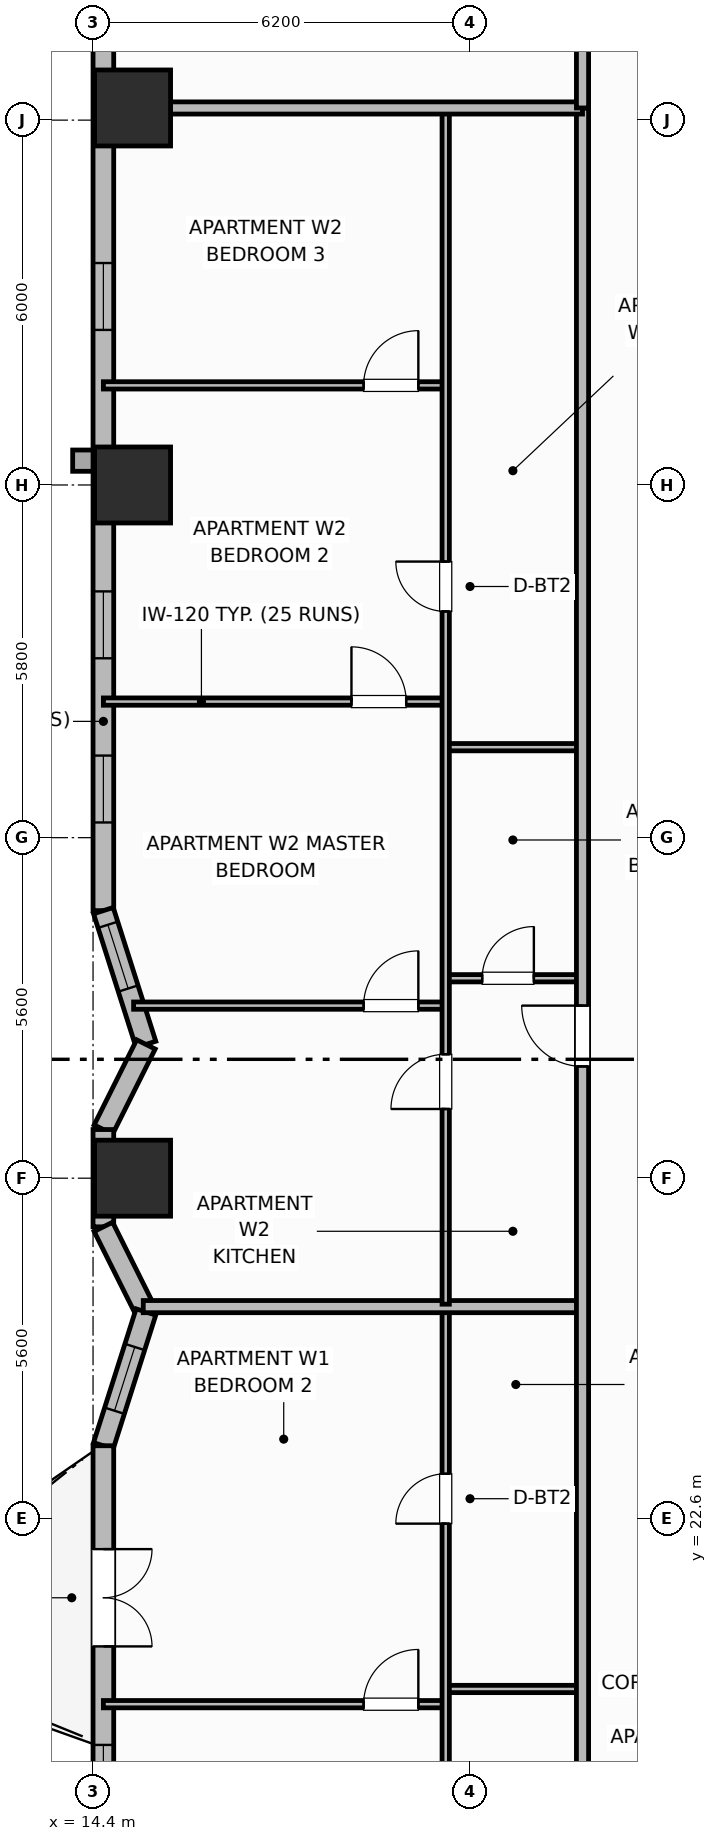
"""IFC4 building model, lengths in metres.
Left out: names, types, materials, properties, quantities, classifications, styles, units other than length and angle.
Written with IfcOpenShell. Run it as: python <this file> out.ifc"""

import sys

from ifc_helpers import new_model, si_unit, direction, frame, frame_2d, origin, origin_2d, place, context, subcontext, project, spatial, rectangle, extrude, element, fill, save


model = new_model("IFC4")
c1 = context("Model", 3, precision=1e-05, world=origin(), true_north=direction((0.0, 1.0)))
c2 = subcontext(c1, "Body", "Model", "MODEL_VIEW")
j1 = project(units=[si_unit("LENGTHUNIT", "METRE"), si_unit("PLANEANGLEUNIT", "RADIAN")], contexts=[c1])
p1 = place(None, origin())
s1 = spatial("IfcSite", under=j1, at=p1, CompositionType="ELEMENT")
p2 = place(p1, origin())
s2 = spatial("IfcBuilding", under=s1, at=p2, CompositionType="ELEMENT")
p3 = place(p2, frame((0.0, 0.0, 58.4)))
s3 = spatial("IfcBuildingStorey", under=s2, at=p3, CompositionType="ELEMENT", Elevation=58.4)
for number, where, z_axis, x_axis in (
    (1, (15.05, 28.2, 0.0), (0.0, 0.0, 1.0), (1.0, 0.0, 0.0)),
    (2, (15.05, 39.6, 0.0), (0.0, 0.0, 1.0), (1.0, 0.0, 0.0)),
    (3, (15.05, 45.8, 0.0), (0.0, 0.0, 1.0), (1.0, 0.0, 0.0)),
):
    element("IfcColumn", number, at=place(p3, frame(where, z_axis=z_axis, x_axis=x_axis)), inside=s3, PredefinedType="COLUMN", context=c2, shape_type="SweptSolid", body=[
        extrude(rectangle(XDim=1.25, YDim=1.25, at=origin_2d()), origin(), (0.0, 0.0, 1.0), 3.7),
    ])
p4 = place(p3, frame((14.57, 47.4, 0.0), z_axis=(0.0, 0.0, 1.0), x_axis=(0.0, -1.0, 0.0)))
e4 = element("IfcWall", 4, at=p4, inside=s3, PredefinedType="SOLIDWALL", context=c2, shape_type="SweptSolid", body=[
    extrude(rectangle(XDim=14.8, YDim=0.34, at=frame_2d((7.4, 0.0))), origin(), (0.0, 0.0, 1.0), 2.7),
])
p5 = place(p4, frame((4.15, 0.0, 0.93)))
e5 = element("IfcOpeningElement", 5, at=p5, cuts=e4, PredefinedType="OPENING", context=c2, shape_type="SweptSolid", body=[
    extrude(rectangle(XDim=1.1, YDim=1.65, at=frame_2d((0.55, 0.825))), frame((0.0, 0.18, 0.0), z_axis=(0.0, -1.0, 0.0), x_axis=(1.0, 0.0, 0.0)), (0.0, 0.0, 1.0), 0.36),
])
p6 = place(p4, frame((9.55, 0.0, 0.93)))
e6 = element("IfcOpeningElement", 6, at=p6, cuts=e4, PredefinedType="OPENING", context=c2, shape_type="SweptSolid", body=[
    extrude(rectangle(XDim=1.1, YDim=1.65, at=frame_2d((0.55, 0.825))), frame((0.0, 0.18, 0.0), z_axis=(0.0, -1.0, 0.0), x_axis=(1.0, 0.0, 0.0)), (0.0, 0.0, 1.0), 0.36),
])
p7 = place(p4, frame((12.25, 0.0, 0.93)))
e7 = element("IfcOpeningElement", 7, at=p7, cuts=e4, PredefinedType="OPENING", context=c2, shape_type="SweptSolid", body=[
    extrude(rectangle(XDim=1.1, YDim=1.65, at=frame_2d((0.55, 0.825))), frame((0.0, 0.18, 0.0), z_axis=(0.0, -1.0, 0.0), x_axis=(1.0, 0.0, 0.0)), (0.0, 0.0, 1.0), 0.36),
])
p8 = place(p3, frame((14.57, 32.6, 0.0), z_axis=(0.0, 0.0, 1.0), x_axis=(0.303160011437, -0.952939666225, 0.0)))
e8 = element("IfcWall", 8, at=p8, inside=s3, PredefinedType="SOLIDWALL", context=c2, shape_type="SweptSolid", body=[
    extrude(rectangle(XDim=2.309, YDim=0.34, at=frame_2d((1.154, 0.0))), origin(), (0.0, 0.0, 1.0), 2.7),
])
p9 = place(p8, frame((0.244, 0.0, 0.89)))
e9 = element("IfcOpeningElement", 9, at=p9, cuts=e8, PredefinedType="OPENING", context=c2, shape_type="SweptSolid", body=[
    extrude(rectangle(XDim=1.1, YDim=1.65, at=frame_2d((0.55, 0.825))), frame((0.0, 0.18, 0.0), z_axis=(0.0, -1.0, 0.0), x_axis=(1.0, 0.0, 0.0)), (0.0, 0.0, 1.0), 0.36),
])
p10 = place(p3, frame((15.27, 30.4, 0.0), z_axis=(0.0, 0.0, 1.0), x_axis=(-0.4472135955, -0.894427191, 0.0)))
e10 = element("IfcWall", 10, at=p10, inside=s3, PredefinedType="SOLIDWALL", context=c2, shape_type="SweptSolid", body=[
    extrude(rectangle(XDim=1.565, YDim=0.34, at=frame_2d((0.783, 0.0))), origin(), (0.0, 0.0, 1.0), 2.7),
])
p11 = place(p3, frame((14.57, 29.0, 0.0), z_axis=(0.0, 0.0, 1.0), x_axis=(0.0, -1.0, 0.0)))
e11 = element("IfcWall", 11, at=p11, inside=s3, PredefinedType="SOLIDWALL", context=c2, shape_type="SweptSolid", body=[
    extrude(rectangle(XDim=1.6, YDim=0.34, at=frame_2d((0.8, 0.0))), origin(), (0.0, 0.0, 1.0), 2.7),
])
p12 = place(p3, frame((14.57, 27.4, 0.0), z_axis=(0.0, 0.0, 1.0), x_axis=(0.4472135955, -0.894427191, 0.0)))
e12 = element("IfcWall", 12, at=p12, inside=s3, PredefinedType="SOLIDWALL", context=c2, shape_type="SweptSolid", body=[
    extrude(rectangle(XDim=1.565, YDim=0.34, at=frame_2d((0.783, 0.0))), origin(), (0.0, 0.0, 1.0), 2.7),
])
p13 = place(p3, frame((15.27, 26.0, 0.0), z_axis=(0.0, 0.0, 1.0), x_axis=(-0.303190562272, -0.952929946507, 0.0)))
e13 = element("IfcWall", 13, at=p13, inside=s3, PredefinedType="SOLIDWALL", context=c2, shape_type="SweptSolid", body=[
    extrude(rectangle(XDim=2.309, YDim=0.34, at=frame_2d((1.154, 0.0))), origin(), (0.0, 0.0, 1.0), 2.7),
])
p14 = place(p13, frame((0.604, 0.0, 0.89)))
e14 = element("IfcOpeningElement", 14, at=p14, cuts=e13, PredefinedType="OPENING", context=c2, shape_type="SweptSolid", body=[
    extrude(rectangle(XDim=1.1, YDim=1.65, at=frame_2d((0.55, 0.825))), frame((0.0, 0.18, 0.0), z_axis=(0.0, -1.0, 0.0), x_axis=(1.0, 0.0, 0.0)), (0.0, 0.0, 1.0), 0.36),
])
p15 = place(p3, frame((14.57, 23.8, 0.0), z_axis=(0.0, 0.0, 1.0), x_axis=(0.0, -1.0, 0.0)))
e15 = element("IfcWall", 15, at=p15, inside=s3, PredefinedType="SOLIDWALL", context=c2, shape_type="SweptSolid", body=[
    extrude(rectangle(XDim=14.8, YDim=0.34, at=frame_2d((7.4, 0.0))), origin(), (0.0, 0.0, 1.0), 2.7),
])
p16 = place(p15, frame((1.7, 0.0, 0.0)))
e16 = element("IfcOpeningElement", 16, at=p16, cuts=e15, PredefinedType="OPENING", context=c2, shape_type="SweptSolid", body=[
    extrude(rectangle(XDim=1.6, YDim=2.1, at=frame_2d((0.8, 1.05))), frame((0.0, 0.18, 0.0), z_axis=(0.0, -1.0, 0.0), x_axis=(1.0, 0.0, 0.0)), (0.0, 0.0, 1.0), 0.36),
])
p17 = place(p15, frame((4.92, 0.0, 0.69)))
e17 = element("IfcOpeningElement", 17, at=p17, cuts=e15, PredefinedType="OPENING", context=c2, shape_type="SweptSolid", body=[
    extrude(rectangle(XDim=1.4, YDim=1.85, at=frame_2d((0.7, 0.925))), frame((0.0, 0.18, 0.0), z_axis=(0.0, -1.0, 0.0), x_axis=(1.0, 0.0, 0.0)), (0.0, 0.0, 1.0), 0.36),
])
p18 = place(p15, frame((9.8, 0.0, 0.68)))
e18 = element("IfcOpeningElement", 18, at=p18, cuts=e15, PredefinedType="OPENING", context=c2, shape_type="SweptSolid", body=[
    extrude(rectangle(XDim=2.1, YDim=1.9, at=frame_2d((1.05, 0.95))), frame((0.0, 0.18, 0.0), z_axis=(0.0, -1.0, 0.0), x_axis=(1.0, 0.0, 0.0)), (0.0, 0.0, 1.0), 0.36),
])
p19 = place(p3, frame((20.2, 19.8, 0.0), z_axis=(0.0, 0.0, 1.0), x_axis=(1.0, 0.0, 0.0)))
e19 = element("IfcWall", 19, at=p19, inside=s3, PredefinedType="PARTITIONING", context=c2, shape_type="SweptSolid", body=[
    extrude(rectangle(XDim=2.25, YDim=0.12, at=frame_2d((1.125, 0.0))), origin(), (0.0, 0.0, 1.0), 2.53),
])
p20 = place(p3, frame((14.57, 19.55, 0.0), z_axis=(0.0, 0.0, 1.0), x_axis=(1.0, 0.0, 0.0)))
e20 = element("IfcWall", 20, at=p20, inside=s3, PredefinedType="PARTITIONING", context=c2, shape_type="SweptSolid", body=[
    extrude(rectangle(XDim=5.63, YDim=0.12, at=frame_2d((2.815, 0.0))), origin(), (0.0, 0.0, 1.0), 2.53),
])
p21 = place(p20, frame((4.28, 0.0, 0.0)))
e21 = element("IfcOpeningElement", 21, at=p21, cuts=e20, PredefinedType="OPENING", context=c2, shape_type="SweptSolid", body=[
    extrude(rectangle(XDim=0.9, YDim=2.1, at=frame_2d((0.45, 1.05))), frame((0.0, 0.07, 0.0), z_axis=(0.0, -1.0, 0.0), x_axis=(1.0, 0.0, 0.0)), (0.0, 0.0, 1.0), 0.14),
])
p22 = place(p3, frame((20.2, 10.64, 0.0), z_axis=(0.0, 0.0, 1.0), x_axis=(0.0, 1.0, 0.0)))
e22 = element("IfcWall", 22, at=p22, inside=s3, PredefinedType="PARTITIONING", context=c2, shape_type="SweptSolid", body=[
    extrude(rectangle(XDim=15.408, YDim=0.12, at=frame_2d((7.704, 0.0))), origin(), (0.0, 0.0, 1.0), 2.53),
])
p23 = place(p22, frame((0.41, 0.0, 0.0)))
e23 = element("IfcOpeningElement", 23, at=p23, cuts=e22, PredefinedType="OPENING", context=c2, shape_type="SweptSolid", body=[
    extrude(rectangle(XDim=0.9, YDim=2.1, at=frame_2d((0.45, 1.05))), frame((0.0, 0.07, 0.0), z_axis=(0.0, -1.0, 0.0), x_axis=(1.0, 0.0, 0.0)), (0.0, 0.0, 1.0), 0.14),
])
p24 = place(p22, frame((11.879, 0.0, 0.0)))
e24 = element("IfcOpeningElement", 24, at=p24, cuts=e22, PredefinedType="OPENING", context=c2, shape_type="SweptSolid", body=[
    extrude(rectangle(XDim=0.82, YDim=2.08, at=frame_2d((0.41, 1.04))), frame((0.0, 0.07, 0.0), z_axis=(0.0, -1.0, 0.0), x_axis=(1.0, 0.0, 0.0)), (0.0, 0.0, 1.0), 0.14),
])
p25 = place(p3, frame((15.226, 26.088, 0.0), z_axis=(0.0, 0.0, 1.0), x_axis=(1.0, 0.0, 0.0)))
e25 = element("IfcWall", 25, at=p25, inside=s3, PredefinedType="PARTITIONING", context=c2, shape_type="SweptSolid", body=[
    extrude(rectangle(XDim=7.224, YDim=0.2, at=frame_2d((3.612, 0.0))), origin(), (0.0, 0.0, 1.0), 2.53),
])
p26 = place(p3, frame((20.2, 31.488, 0.0), z_axis=(0.0, 0.0, 1.0), x_axis=(1.0, 0.0, 0.0)))
e26 = element("IfcWall", 26, at=p26, inside=s3, PredefinedType="PARTITIONING", context=c2, shape_type="SweptSolid", body=[
    extrude(rectangle(XDim=2.25, YDim=0.12, at=frame_2d((1.125, 0.0))), origin(), (0.0, 0.0, 1.0), 2.53),
])
p27 = place(p26, frame((0.6, 0.0, 0.0)))
e27 = element("IfcOpeningElement", 27, at=p27, cuts=e26, PredefinedType="OPENING", context=c2, shape_type="SweptSolid", body=[
    extrude(rectangle(XDim=0.85, YDim=2.1, at=frame_2d((0.425, 1.05))), frame((0.0, 0.07, 0.0), z_axis=(0.0, -1.0, 0.0), x_axis=(1.0, 0.0, 0.0)), (0.0, 0.0, 1.0), 0.14),
])
p28 = place(p3, frame((20.2, 35.288, 0.0), z_axis=(0.0, 0.0, 1.0), x_axis=(1.0, 0.0, 0.0)))
e28 = element("IfcWall", 28, at=p28, inside=s3, PredefinedType="PARTITIONING", context=c2, shape_type="SweptSolid", body=[
    extrude(rectangle(XDim=2.25, YDim=0.12, at=frame_2d((1.125, 0.0))), origin(), (0.0, 0.0, 1.0), 2.53),
])
p29 = place(p3, frame((15.067, 31.038, 0.0), z_axis=(0.0, 0.0, 1.0), x_axis=(1.0, 0.0, 0.0)))
e29 = element("IfcWall", 29, at=p29, inside=s3, PredefinedType="PARTITIONING", context=c2, shape_type="SweptSolid", body=[
    extrude(rectangle(XDim=5.133, YDim=0.12, at=frame_2d((2.566, 0.0))), origin(), (0.0, 0.0, 1.0), 2.53),
])
p30 = place(p29, frame((3.783, 0.0, 0.0)))
e30 = element("IfcOpeningElement", 30, at=p30, cuts=e29, PredefinedType="OPENING", context=c2, shape_type="SweptSolid", body=[
    extrude(rectangle(XDim=0.9, YDim=2.1, at=frame_2d((0.45, 1.05))), frame((0.0, 0.07, 0.0), z_axis=(0.0, -1.0, 0.0), x_axis=(1.0, 0.0, 0.0)), (0.0, 0.0, 1.0), 0.14),
])
p31 = place(p3, frame((14.57, 36.038, 0.0), z_axis=(0.0, 0.0, 1.0), x_axis=(1.0, 0.0, 0.0)))
e31 = element("IfcWall", 31, at=p31, inside=s3, PredefinedType="PARTITIONING", context=c2, shape_type="SweptSolid", body=[
    extrude(rectangle(XDim=5.63, YDim=0.12, at=frame_2d((2.815, 0.0))), origin(), (0.0, 0.0, 1.0), 2.53),
])
p32 = place(p31, frame((4.08, 0.0, 0.0)))
e32 = element("IfcOpeningElement", 32, at=p32, cuts=e31, PredefinedType="OPENING", context=c2, shape_type="SweptSolid", body=[
    extrude(rectangle(XDim=0.9, YDim=2.1, at=frame_2d((0.45, 1.05))), frame((0.0, 0.07, 0.0), z_axis=(0.0, -1.0, 0.0), x_axis=(1.0, 0.0, 0.0)), (0.0, 0.0, 1.0), 0.14),
])
p33 = place(p3, frame((14.57, 41.238, 0.0), z_axis=(0.0, 0.0, 1.0), x_axis=(1.0, 0.0, 0.0)))
e33 = element("IfcWall", 33, at=p33, inside=s3, PredefinedType="PARTITIONING", context=c2, shape_type="SweptSolid", body=[
    extrude(rectangle(XDim=5.63, YDim=0.12, at=frame_2d((2.815, 0.0))), origin(), (0.0, 0.0, 1.0), 2.53),
])
p34 = place(p33, frame((4.28, 0.0, 0.0)))
e34 = element("IfcOpeningElement", 34, at=p34, cuts=e33, PredefinedType="OPENING", context=c2, shape_type="SweptSolid", body=[
    extrude(rectangle(XDim=0.9, YDim=2.1, at=frame_2d((0.45, 1.05))), frame((0.0, 0.07, 0.0), z_axis=(0.0, -1.0, 0.0), x_axis=(1.0, 0.0, 0.0)), (0.0, 0.0, 1.0), 0.14),
])
p35 = place(p3, frame((20.2, 26.128, 0.0), z_axis=(0.0, 0.0, 1.0), x_axis=(0.0, 1.0, 0.0)))
e35 = element("IfcWall", 35, at=p35, inside=s3, PredefinedType="PARTITIONING", context=c2, shape_type="SweptSolid", body=[
    extrude(rectangle(XDim=19.632, YDim=0.12, at=frame_2d((9.816, 0.0))), origin(), (0.0, 0.0, 1.0), 2.53),
])
p36 = place(p35, frame((3.21, 0.0, 0.0)))
e36 = element("IfcOpeningElement", 36, at=p36, cuts=e35, PredefinedType="OPENING", context=c2, shape_type="SweptSolid", body=[
    extrude(rectangle(XDim=0.9, YDim=2.1, at=frame_2d((0.45, 1.05))), frame((0.0, 0.07, 0.0), z_axis=(0.0, -1.0, 0.0), x_axis=(1.0, 0.0, 0.0)), (0.0, 0.0, 1.0), 0.14),
])
p37 = place(p35, frame((11.392, 0.0, 0.0)))
e37 = element("IfcOpeningElement", 37, at=p37, cuts=e35, PredefinedType="OPENING", context=c2, shape_type="SweptSolid", body=[
    extrude(rectangle(XDim=0.82, YDim=2.08, at=frame_2d((0.41, 1.04))), frame((0.0, 0.07, 0.0), z_axis=(0.0, -1.0, 0.0), x_axis=(1.0, 0.0, 0.0)), (0.0, 0.0, 1.0), 0.14),
])
p38 = place(p3, frame((22.45, 10.6, 0.0), z_axis=(0.0, 0.0, 1.0), x_axis=(0.0, 1.0, 0.0)))
e38 = element("IfcWall", 38, at=p38, inside=s3, PredefinedType="PARTITIONING", context=c2, shape_type="SweptSolid", body=[
    extrude(rectangle(XDim=35.2, YDim=0.2, at=frame_2d((17.6, 0.0))), origin(), (0.0, 0.0, 1.0), 2.53),
])
p39 = place(p38, frame((2.65, 0.0, 0.0)))
e39 = element("IfcOpeningElement", 39, at=p39, cuts=e38, PredefinedType="OPENING", context=c2, shape_type="SweptSolid", body=[
    extrude(rectangle(XDim=1.0, YDim=2.15, at=frame_2d((0.5, 1.075))), frame((0.0, 0.11, 0.0), z_axis=(0.0, -1.0, 0.0), x_axis=(1.0, 0.0, 0.0)), (0.0, 0.0, 1.0), 0.22),
])
p40 = place(p38, frame((19.438, 0.0, 0.0)))
e40 = element("IfcOpeningElement", 40, at=p40, cuts=e38, PredefinedType="OPENING", context=c2, shape_type="SweptSolid", body=[
    extrude(rectangle(XDim=1.0, YDim=2.15, at=frame_2d((0.5, 1.075))), frame((0.0, 0.11, 0.0), z_axis=(0.0, -1.0, 0.0), x_axis=(1.0, 0.0, 0.0)), (0.0, 0.0, 1.0), 0.22),
])
p41 = place(p3, frame((14.99, 45.8, 0.0), z_axis=(0.0, 0.0, 1.0), x_axis=(1.0, 0.0, 0.0)))
e41 = element("IfcWall", 41, at=p41, inside=s3, PredefinedType="PARTITIONING", context=c2, shape_type="SweptSolid", body=[
    extrude(rectangle(XDim=7.46, YDim=0.2, at=frame_2d((3.73, 0.0))), origin(), (0.0, 0.0, 1.0), 2.53),
])
p42 = place(p3, frame((22.45, 45.8, 0.0), z_axis=(0.0, 0.0, 1.0), x_axis=(0.0, 1.0, 0.0)))
e42 = element("IfcWall", 42, at=p42, inside=s3, PredefinedType="PARTITIONING", context=c2, shape_type="SweptSolid", body=[
    extrude(rectangle(XDim=5.63, YDim=0.2, at=frame_2d((2.815, 0.0))), origin(), (0.0, 0.0, 1.0), 2.53),
])
p43 = place(p5, origin())
e43 = element("IfcWindow", 43, at=p43, inside=s3, PartitioningType="SINGLE_PANEL", PredefinedType="WINDOW", context=c2, shape_type="SweptSolid", body=[
    extrude(rectangle(XDim=1.1, YDim=1.65, at=frame_2d((0.55, 0.825))), frame((0.0, 0.03, 0.0), z_axis=(0.0, -1.0, 0.0), x_axis=(1.0, 0.0, 0.0)), (0.0, 0.0, 1.0), 0.06),
])
fill(e5, e43)
p44 = place(p6, origin())
e44 = element("IfcWindow", 44, at=p44, inside=s3, PartitioningType="SINGLE_PANEL", PredefinedType="WINDOW", context=c2, shape_type="SweptSolid", body=[
    extrude(rectangle(XDim=1.1, YDim=1.65, at=frame_2d((0.55, 0.825))), frame((0.0, 0.03, 0.0), z_axis=(0.0, -1.0, 0.0), x_axis=(1.0, 0.0, 0.0)), (0.0, 0.0, 1.0), 0.06),
])
fill(e6, e44)
p45 = place(p7, origin())
e45 = element("IfcWindow", 45, at=p45, inside=s3, PartitioningType="SINGLE_PANEL", PredefinedType="WINDOW", context=c2, shape_type="SweptSolid", body=[
    extrude(rectangle(XDim=1.1, YDim=1.65, at=frame_2d((0.55, 0.825))), frame((0.0, 0.03, 0.0), z_axis=(0.0, -1.0, 0.0), x_axis=(1.0, 0.0, 0.0)), (0.0, 0.0, 1.0), 0.06),
])
fill(e7, e45)
p46 = place(p9, origin())
e46 = element("IfcWindow", 46, at=p46, inside=s3, PartitioningType="SINGLE_PANEL", PredefinedType="WINDOW", context=c2, shape_type="SweptSolid", body=[
    extrude(rectangle(XDim=1.1, YDim=1.65, at=frame_2d((0.55, 0.825))), frame((0.0, 0.03, 0.0), z_axis=(0.0, -1.0, 0.0), x_axis=(1.0, 0.0, 0.0)), (0.0, 0.0, 1.0), 0.06),
])
fill(e9, e46)
p47 = place(p14, origin())
e47 = element("IfcWindow", 47, at=p47, inside=s3, PartitioningType="SINGLE_PANEL", PredefinedType="WINDOW", context=c2, shape_type="SweptSolid", body=[
    extrude(rectangle(XDim=1.1, YDim=1.65, at=frame_2d((0.55, 0.825))), frame((0.0, 0.03, 0.0), z_axis=(0.0, -1.0, 0.0), x_axis=(1.0, 0.0, 0.0)), (0.0, 0.0, 1.0), 0.06),
])
fill(e14, e47)
p48 = place(p16, origin())
e48 = element("IfcDoor", 48, at=p48, inside=s3, OperationType="DOUBLE_DOOR_SINGLE_SWING", PredefinedType="DOOR", context=c2, shape_type="SweptSolid", body=[
    extrude(rectangle(XDim=1.6, YDim=2.1, at=frame_2d((0.8, 1.05))), frame((0.0, 0.025, 0.0), z_axis=(0.0, -1.0, 0.0), x_axis=(1.0, 0.0, 0.0)), (0.0, 0.0, 1.0), 0.05),
])
fill(e16, e48)
p49 = place(p17, origin())
e49 = element("IfcWindow", 49, at=p49, inside=s3, PartitioningType="SINGLE_PANEL", PredefinedType="WINDOW", context=c2, shape_type="SweptSolid", body=[
    extrude(rectangle(XDim=1.4, YDim=1.85, at=frame_2d((0.7, 0.925))), frame((0.0, 0.03, 0.0), z_axis=(0.0, -1.0, 0.0), x_axis=(1.0, 0.0, 0.0)), (0.0, 0.0, 1.0), 0.06),
])
fill(e17, e49)
p50 = place(p21, origin())
e50 = element("IfcDoor", 50, at=p50, inside=s3, OperationType="SINGLE_SWING_RIGHT", PredefinedType="DOOR", context=c2, shape_type="SweptSolid", body=[
    extrude(rectangle(XDim=0.9, YDim=2.1, at=frame_2d((0.45, 1.05))), frame((0.0, 0.025, 0.0), z_axis=(0.0, -1.0, 0.0), x_axis=(1.0, 0.0, 0.0)), (0.0, 0.0, 1.0), 0.05),
])
fill(e21, e50)
p51 = place(p24, origin())
e51 = element("IfcDoor", 51, at=p51, inside=s3, OperationType="SINGLE_SWING_LEFT", PredefinedType="DOOR", context=c2, shape_type="SweptSolid", body=[
    extrude(rectangle(XDim=0.82, YDim=2.08, at=frame_2d((0.41, 1.04))), frame((0.0, 0.025, 0.0), z_axis=(0.0, -1.0, 0.0), x_axis=(1.0, 0.0, 0.0)), (0.0, 0.0, 1.0), 0.05),
])
fill(e24, e51)
p52 = place(p27, origin())
e52 = element("IfcDoor", 52, at=p52, inside=s3, OperationType="SINGLE_SWING_RIGHT", PredefinedType="DOOR", context=c2, shape_type="SweptSolid", body=[
    extrude(rectangle(XDim=0.85, YDim=2.1, at=frame_2d((0.425, 1.05))), frame((0.0, 0.025, 0.0), z_axis=(0.0, -1.0, 0.0), x_axis=(1.0, 0.0, 0.0)), (0.0, 0.0, 1.0), 0.05),
])
fill(e27, e52)
p53 = place(p30, origin())
e53 = element("IfcDoor", 53, at=p53, inside=s3, OperationType="SINGLE_SWING_RIGHT", PredefinedType="DOOR", context=c2, shape_type="SweptSolid", body=[
    extrude(rectangle(XDim=0.9, YDim=2.1, at=frame_2d((0.45, 1.05))), frame((0.0, 0.025, 0.0), z_axis=(0.0, -1.0, 0.0), x_axis=(1.0, 0.0, 0.0)), (0.0, 0.0, 1.0), 0.05),
])
fill(e30, e53)
p54 = place(p32, origin())
e54 = element("IfcDoor", 54, at=p54, inside=s3, OperationType="SINGLE_SWING_LEFT", PredefinedType="DOOR", context=c2, shape_type="SweptSolid", body=[
    extrude(rectangle(XDim=0.9, YDim=2.1, at=frame_2d((0.45, 1.05))), frame((0.0, 0.025, 0.0), z_axis=(0.0, -1.0, 0.0), x_axis=(1.0, 0.0, 0.0)), (0.0, 0.0, 1.0), 0.05),
])
fill(e32, e54)
p55 = place(p34, origin())
e55 = element("IfcDoor", 55, at=p55, inside=s3, OperationType="SINGLE_SWING_RIGHT", PredefinedType="DOOR", context=c2, shape_type="SweptSolid", body=[
    extrude(rectangle(XDim=0.9, YDim=2.1, at=frame_2d((0.45, 1.05))), frame((0.0, 0.025, 0.0), z_axis=(0.0, -1.0, 0.0), x_axis=(1.0, 0.0, 0.0)), (0.0, 0.0, 1.0), 0.05),
])
fill(e34, e55)
p56 = place(p36, origin())
e56 = element("IfcDoor", 56, at=p56, inside=s3, OperationType="SINGLE_SWING_LEFT", PredefinedType="DOOR", context=c2, shape_type="SweptSolid", body=[
    extrude(rectangle(XDim=0.9, YDim=2.1, at=frame_2d((0.45, 1.05))), frame((0.0, 0.025, 0.0), z_axis=(0.0, -1.0, 0.0), x_axis=(1.0, 0.0, 0.0)), (0.0, 0.0, 1.0), 0.05),
])
fill(e36, e56)
p57 = place(p37, origin())
e57 = element("IfcDoor", 57, at=p57, inside=s3, OperationType="SINGLE_SWING_RIGHT", PredefinedType="DOOR", context=c2, shape_type="SweptSolid", body=[
    extrude(rectangle(XDim=0.82, YDim=2.08, at=frame_2d((0.41, 1.04))), frame((0.0, 0.025, 0.0), z_axis=(0.0, -1.0, 0.0), x_axis=(1.0, 0.0, 0.0)), (0.0, 0.0, 1.0), 0.05),
])
fill(e37, e57)
p58 = place(p40, origin())
e58 = element("IfcDoor", 58, at=p58, inside=s3, OperationType="SINGLE_SWING_RIGHT", PredefinedType="DOOR", context=c2, shape_type="SweptSolid", body=[
    extrude(rectangle(XDim=1.0, YDim=2.15, at=frame_2d((0.5, 1.075))), frame((0.0, 0.025, 0.0), z_axis=(0.0, -1.0, 0.0), x_axis=(1.0, 0.0, 0.0)), (0.0, 0.0, 1.0), 0.05),
])
fill(e40, e58)
save(model, sys.argv[1])
